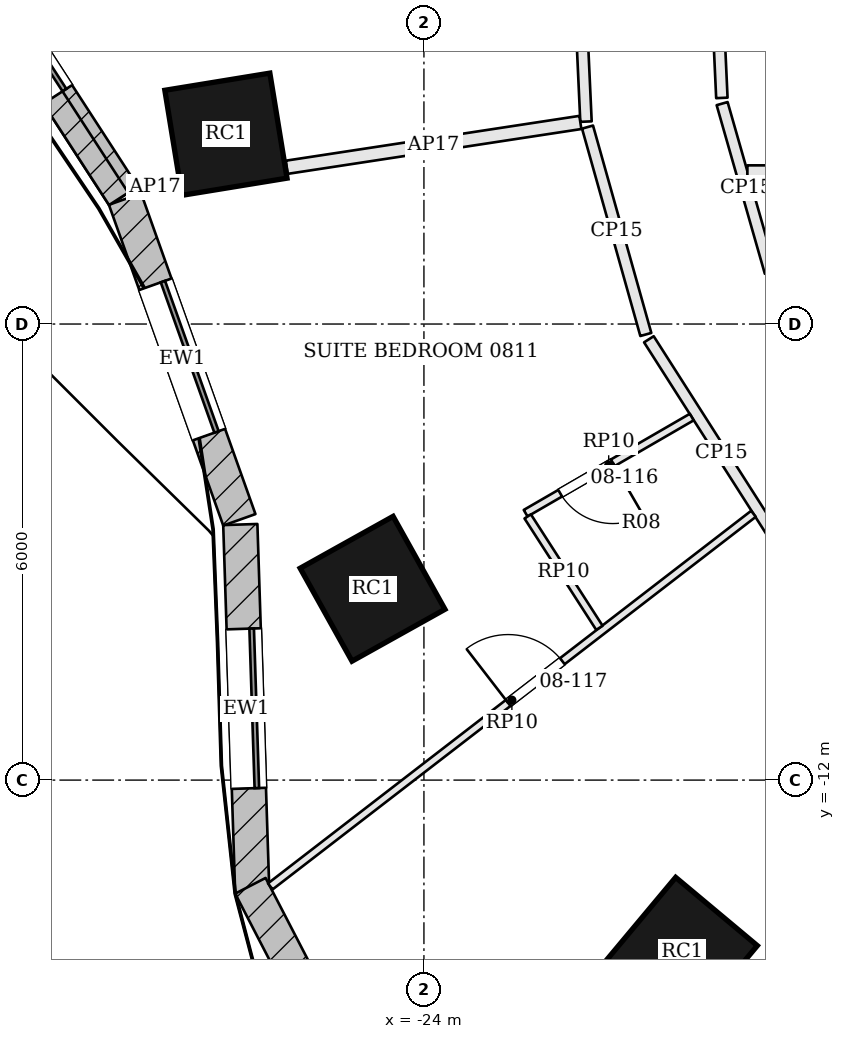
"""IFC4 building model, lengths in metres.
Left out: names, types, materials, properties, quantities, classifications, styles, units other than length and angle.
Written with IfcOpenShell. Run it as: python <this file> out.ifc"""

import sys

from ifc_helpers import new_model, si_unit, direction, frame, frame_2d, origin, origin_2d, place, context, subcontext, project, spatial, rectangle, extrude, element, fill, save


model = new_model("IFC4")
c1 = context("Model", 3, precision=1e-05, world=origin(), true_north=direction((0.0, 1.0)))
c2 = subcontext(c1, "Body", "Model", "MODEL_VIEW")
j1 = project(units=[si_unit("LENGTHUNIT", "METRE"), si_unit("PLANEANGLEUNIT", "RADIAN")], contexts=[c1])
p1 = place(None, origin())
s1 = spatial("IfcSite", under=j1, at=p1, CompositionType="ELEMENT")
p2 = place(p1, origin())
s2 = spatial("IfcBuilding", under=s1, at=p2, CompositionType="ELEMENT")
p3 = place(p2, frame((0.0, 0.0, 44.7)))
s3 = spatial("IfcBuildingStorey", under=s2, at=p3, CompositionType="ELEMENT", Elevation=44.7)
for number, where, z_axis, x_axis in (
    (1, (-26.605, -3.503, 0.0), (0.0, 0.0, 1.0), (0.161, -0.987, 0.0)),
    (2, (-24.676, -9.483, 0.0), (0.0, 0.0, 1.0), (0.487, -0.873, 0.0)),
    (3, (-20.6, -14.266, 0.0), (0.0, 0.0, 1.0), (0.767, -0.641, 0.0)),
):
    element("IfcColumn", number, at=place(p3, frame(where, z_axis=z_axis, x_axis=x_axis)), inside=s3, PredefinedType="COLUMN", context=c2, shape_type="SweptSolid", body=[
        extrude(rectangle(XDim=1.4, YDim=1.4, at=origin_2d()), origin(), (0.0, 0.0, 1.0), 3.6),
    ])
p4 = place(p3, frame((-30.825, 0.117, 0.0), z_axis=(0.0, 0.0, 1.0), x_axis=(0.543975629516, -0.839101015666, 0.0)))
e4 = element("IfcWall", 4, at=p4, inside=s3, PredefinedType="SOLIDWALL", context=c2, shape_type="SweptSolid", body=[
    extrude(rectangle(XDim=5.281, YDim=0.45, at=frame_2d((2.641, 0.0))), origin(), (0.0, 0.0, 1.0), 3.4),
])
p5 = place(p4, frame((1.591, 0.0, 0.9)))
e5 = element("IfcOpeningElement", 5, at=p5, cuts=e4, PredefinedType="OPENING", context=c2, shape_type="SweptSolid", body=[
    extrude(rectangle(XDim=2.1, YDim=2.0, at=frame_2d((1.05, 1.0))), frame((0.0, 0.235, 0.0), z_axis=(0.0, -1.0, 0.0), x_axis=(1.0, 0.0, 0.0)), (0.0, 0.0, 1.0), 0.47),
])
p6 = place(p3, frame((-27.933, -4.356, 0.0), z_axis=(0.0, 0.0, 1.0), x_axis=(0.335746005454, -0.941952557097, 0.0)))
e6 = element("IfcWall", 6, at=p6, inside=s3, PredefinedType="SOLIDWALL", context=c2, shape_type="SweptSolid", body=[
    extrude(rectangle(XDim=4.48, YDim=0.45, at=frame_2d((2.24, 0.0))), origin(), (0.0, 0.0, 1.0), 3.4),
])
p7 = place(p6, frame((1.19, 0.0, 0.9)))
e7 = element("IfcOpeningElement", 7, at=p7, cuts=e6, PredefinedType="OPENING", context=c2, shape_type="SweptSolid", body=[
    extrude(rectangle(XDim=2.1, YDim=2.0, at=frame_2d((1.05, 1.0))), frame((0.0, 0.235, 0.0), z_axis=(0.0, -1.0, 0.0), x_axis=(1.0, 0.0, 0.0)), (0.0, 0.0, 1.0), 0.47),
])
p8 = place(p3, frame((-26.416, -8.638, 0.0), z_axis=(0.0, 0.0, 1.0), x_axis=(0.03254979302, -0.999470115098, 0.0)))
e8 = element("IfcWall", 8, at=p8, inside=s3, PredefinedType="SOLIDWALL", context=c2, shape_type="SweptSolid", body=[
    extrude(rectangle(XDim=4.845, YDim=0.45, at=frame_2d((2.423, 0.0))), origin(), (0.0, 0.0, 1.0), 3.4),
])
p9 = place(p8, frame((1.373, 0.0, 0.9)))
e9 = element("IfcOpeningElement", 9, at=p9, cuts=e8, PredefinedType="OPENING", context=c2, shape_type="SweptSolid", body=[
    extrude(rectangle(XDim=2.1, YDim=2.0, at=frame_2d((1.05, 1.0))), frame((0.0, 0.235, 0.0), z_axis=(0.0, -1.0, 0.0), x_axis=(1.0, 0.0, 0.0)), (0.0, 0.0, 1.0), 0.47),
])
p10 = place(p3, frame((-26.283, -13.391, 0.0), z_axis=(0.0, 0.0, 1.0), x_axis=(0.459485057932, -0.888185499509, 0.0)))
e10 = element("IfcWall", 10, at=p10, inside=s3, PredefinedType="SOLIDWALL", context=c2, shape_type="SweptSolid", body=[
    extrude(rectangle(XDim=4.703, YDim=0.45, at=frame_2d((2.352, 0.0))), origin(), (0.0, 0.0, 1.0), 3.4),
])
p11 = place(p10, frame((1.302, 0.0, 0.9)))
e11 = element("IfcOpeningElement", 11, at=p11, cuts=e10, PredefinedType="OPENING", context=c2, shape_type="SweptSolid", body=[
    extrude(rectangle(XDim=2.1, YDim=2.0, at=frame_2d((1.05, 1.0))), frame((0.0, 0.235, 0.0), z_axis=(0.0, -1.0, 0.0), x_axis=(1.0, 0.0, 0.0)), (0.0, 0.0, 1.0), 0.47),
])
p12 = place(p3, frame((-30.831, -0.011, 3.6), z_axis=(0.0, 0.0, 1.0), x_axis=(0.543918219167, -0.839138231079, 0.0)))
e12 = element("IfcWall", 12, at=p12, inside=s3, PredefinedType="PARAPET", context=c2, shape_type="SweptSolid", body=[
    extrude(rectangle(XDim=5.174, YDim=0.3, at=frame_2d((2.587, 0.0))), origin(), (0.0, 0.0, 1.0), 1.1),
])
p13 = place(p3, frame((-22.074, 1.16, 0.0), z_axis=(0.0, 0.0, 1.0), x_axis=(0.04582833941, -0.998949329699, 0.0)))
e13 = element("IfcWall", 13, at=p13, inside=s3, PredefinedType="PARTITIONING", context=c2, shape_type="SweptSolid", body=[
    extrude(rectangle(XDim=4.501, YDim=0.15, at=frame_2d((2.251, 0.0))), origin(), (0.0, 0.0, 1.0), 2.68),
])
p14 = place(p13, frame((2.267, 0.0, 0.0)))
e14 = element("IfcOpeningElement", 14, at=p14, cuts=e13, PredefinedType="OPENING", context=c2, shape_type="SweptSolid", body=[
    extrude(rectangle(XDim=1.0, YDim=2.1, at=frame_2d((0.5, 1.05))), frame((0.0, 0.085, 0.0), z_axis=(0.0, -1.0, 0.0), x_axis=(1.0, 0.0, 0.0)), (0.0, 0.0, 1.0), 0.17),
])
p15 = place(p3, frame((-27.845, -4.249, 0.0), z_axis=(0.0, 0.0, 1.0), x_axis=(0.988533937995, 0.15099885242, 0.0)))
e15 = element("IfcWall", 15, at=p15, inside=s3, PredefinedType="PARTITIONING", context=c2, shape_type="SweptSolid", body=[
    extrude(rectangle(XDim=0.624, YDim=0.175, at=frame_2d((0.312, 0.0))), origin(), (0.0, 0.0, 1.0), 2.68),
])
p16 = place(p3, frame((-25.804, -3.938, 0.0), z_axis=(0.0, 0.0, 1.0), x_axis=(0.988549437975, 0.15089734484, 0.0)))
e16 = element("IfcWall", 16, at=p16, inside=s3, PredefinedType="PARTITIONING", context=c2, shape_type="SweptSolid", body=[
    extrude(rectangle(XDim=3.907, YDim=0.175, at=frame_2d((1.954, 0.0))), origin(), (0.0, 0.0, 1.0), 2.68),
])
p17 = place(p3, frame((-21.848, -3.409, 0.0), z_axis=(0.0, 0.0, 1.0), x_axis=(0.27056596431, -0.962701438119, 0.0)))
e17 = element("IfcWall", 17, at=p17, inside=s3, PredefinedType="PARTITIONING", context=c2, shape_type="SweptSolid", body=[
    extrude(rectangle(XDim=2.834, YDim=0.15, at=frame_2d((1.417, 0.0))), origin(), (0.0, 0.0, 1.0), 2.68),
])
p18 = place(p3, frame((-21.041, -6.201, 0.0), z_axis=(0.0, 0.0, 1.0), x_axis=(0.537680823918, -0.843148463552, 0.0)))
e18 = element("IfcWall", 18, at=p18, inside=s3, PredefinedType="PARTITIONING", context=c2, shape_type="SweptSolid", body=[
    extrude(rectangle(XDim=3.549, YDim=0.15, at=frame_2d((1.775, 0.0))), origin(), (0.0, 0.0, 1.0), 2.68),
])
p19 = place(p3, frame((-19.443, -5.319, 0.0), z_axis=(0.0, 0.0, 1.0), x_axis=(-0.274791002319, 0.961503980774, 0.0)))
e19 = element("IfcWall", 19, at=p19, inside=s3, PredefinedType="PARTITIONING", context=c2, shape_type="SweptSolid", body=[
    extrude(rectangle(XDim=2.307, YDim=0.15, at=frame_2d((1.154, 0.0))), origin(), (0.0, 0.0, 1.0), 2.68),
])
p20 = place(p3, frame((-20.08, -3.025, 0.0), z_axis=(0.0, 0.0, 1.0), x_axis=(-0.04581750387, 0.998949826738, 0.0)))
e20 = element("IfcWall", 20, at=p20, inside=s3, PredefinedType="PARTITIONING", context=c2, shape_type="SweptSolid", body=[
    extrude(rectangle(XDim=4.188, YDim=0.15, at=frame_2d((2.094, 0.0))), origin(), (0.0, 0.0, 1.0), 2.68),
])
p21 = place(p3, frame((-26.021, -13.398, 0.0), z_axis=(0.0, 0.0, 1.0), x_axis=(0.791898657623, 0.610652532996, 0.0)))
e21 = element("IfcWall", 21, at=p21, inside=s3, PredefinedType="PARTITIONING", context=c2, shape_type="SweptSolid", body=[
    extrude(rectangle(XDim=8.027, YDim=0.1, at=frame_2d((4.013, 0.0))), origin(), (0.0, 0.0, 1.0), 2.68),
])
p22 = place(p21, frame((3.952, 0.0, 0.0)))
e22 = element("IfcOpeningElement", 22, at=p22, cuts=e21, PredefinedType="OPENING", context=c2, shape_type="SweptSolid", body=[
    extrude(rectangle(XDim=0.9, YDim=2.4, at=frame_2d((0.45, 1.2))), frame((0.0, 0.06, 0.0), z_axis=(0.0, -1.0, 0.0), x_axis=(1.0, 0.0, 0.0)), (0.0, 0.0, 1.0), 0.12),
])
p23 = place(p3, frame((-20.477, -7.224, 0.0), z_axis=(0.0, 0.0, 1.0), x_axis=(-0.865450559372, -0.50099434057, 0.0)))
e23 = element("IfcWall", 23, at=p23, inside=s3, PredefinedType="PARTITIONING", context=c2, shape_type="SweptSolid", body=[
    extrude(rectangle(XDim=2.525, YDim=0.1, at=frame_2d((1.262, 0.0))), origin(), (0.0, 0.0, 1.0), 2.68),
])
p24 = place(p23, frame((1.2, 0.0, 0.0)))
e24 = element("IfcOpeningElement", 24, at=p24, cuts=e23, PredefinedType="OPENING", context=c2, shape_type="SweptSolid", body=[
    extrude(rectangle(XDim=0.8, YDim=2.1, at=frame_2d((0.4, 1.05))), frame((0.0, 0.06, 0.0), z_axis=(0.0, -1.0, 0.0), x_axis=(1.0, 0.0, 0.0)), (0.0, 0.0, 1.0), 0.12),
])
p25 = place(p3, frame((-22.635, -8.531, 0.0), z_axis=(0.0, 0.0, 1.0), x_axis=(0.54118224554, -0.840905331837, 0.0)))
e25 = element("IfcWall", 25, at=p25, inside=s3, PredefinedType="PARTITIONING", context=c2, shape_type="SweptSolid", body=[
    extrude(rectangle(XDim=1.743, YDim=0.1, at=frame_2d((0.872, 0.0))), origin(), (0.0, 0.0, 1.0), 2.68),
])
p26 = place(p3, frame((-19.745, -4.0, 0.0), z_axis=(0.0, 0.0, 1.0), x_axis=(1.0, 0.0, 0.0)))
e26 = element("IfcWall", 26, at=p26, inside=s3, PredefinedType="PARTITIONING", context=c2, shape_type="SweptSolid", body=[
    extrude(rectangle(XDim=4.87, YDim=0.175, at=frame_2d((2.435, 0.0))), origin(), (0.0, 0.0, 1.0), 2.68),
])
p27 = place(p5, origin())
e27 = element("IfcWindow", 27, at=p27, inside=s3, PartitioningType="SINGLE_PANEL", PredefinedType="WINDOW", context=c2, shape_type="SweptSolid", body=[
    extrude(rectangle(XDim=2.1, YDim=2.0, at=frame_2d((1.05, 1.0))), frame((0.0, 0.135, 0.0), z_axis=(0.0, -1.0, 0.0), x_axis=(1.0, 0.0, 0.0)), (0.0, 0.0, 1.0), 0.06),
])
fill(e5, e27)
p28 = place(p7, origin())
e28 = element("IfcWindow", 28, at=p28, inside=s3, PartitioningType="SINGLE_PANEL", PredefinedType="WINDOW", context=c2, shape_type="SweptSolid", body=[
    extrude(rectangle(XDim=2.1, YDim=2.0, at=frame_2d((1.05, 1.0))), frame((0.0, 0.135, 0.0), z_axis=(0.0, -1.0, 0.0), x_axis=(1.0, 0.0, 0.0)), (0.0, 0.0, 1.0), 0.06),
])
fill(e7, e28)
p29 = place(p9, origin())
e29 = element("IfcWindow", 29, at=p29, inside=s3, PartitioningType="SINGLE_PANEL", PredefinedType="WINDOW", context=c2, shape_type="SweptSolid", body=[
    extrude(rectangle(XDim=2.1, YDim=2.0, at=frame_2d((1.05, 1.0))), frame((0.0, 0.135, 0.0), z_axis=(0.0, -1.0, 0.0), x_axis=(1.0, 0.0, 0.0)), (0.0, 0.0, 1.0), 0.06),
])
fill(e9, e29)
p30 = place(p24, origin())
e30 = element("IfcDoor", 30, at=p30, inside=s3, OperationType="SINGLE_SWING_LEFT", PredefinedType="DOOR", context=c2, shape_type="SweptSolid", body=[
    extrude(rectangle(XDim=0.8, YDim=2.1, at=frame_2d((0.4, 1.05))), frame((0.0, 0.025, 0.0), z_axis=(0.0, -1.0, 0.0), x_axis=(1.0, 0.0, 0.0)), (0.0, 0.0, 1.0), 0.05),
])
fill(e24, e30)
p31 = place(p22, origin())
e31 = element("IfcDoor", 31, at=p31, inside=s3, OperationType="SINGLE_SWING_LEFT", PredefinedType="DOOR", context=c2, shape_type="SweptSolid", body=[
    extrude(rectangle(XDim=0.9, YDim=2.4, at=frame_2d((0.45, 1.2))), frame((0.0, 0.025, 0.0), z_axis=(0.0, -1.0, 0.0), x_axis=(1.0, 0.0, 0.0)), (0.0, 0.0, 1.0), 0.05),
])
fill(e22, e31)
save(model, sys.argv[1])
